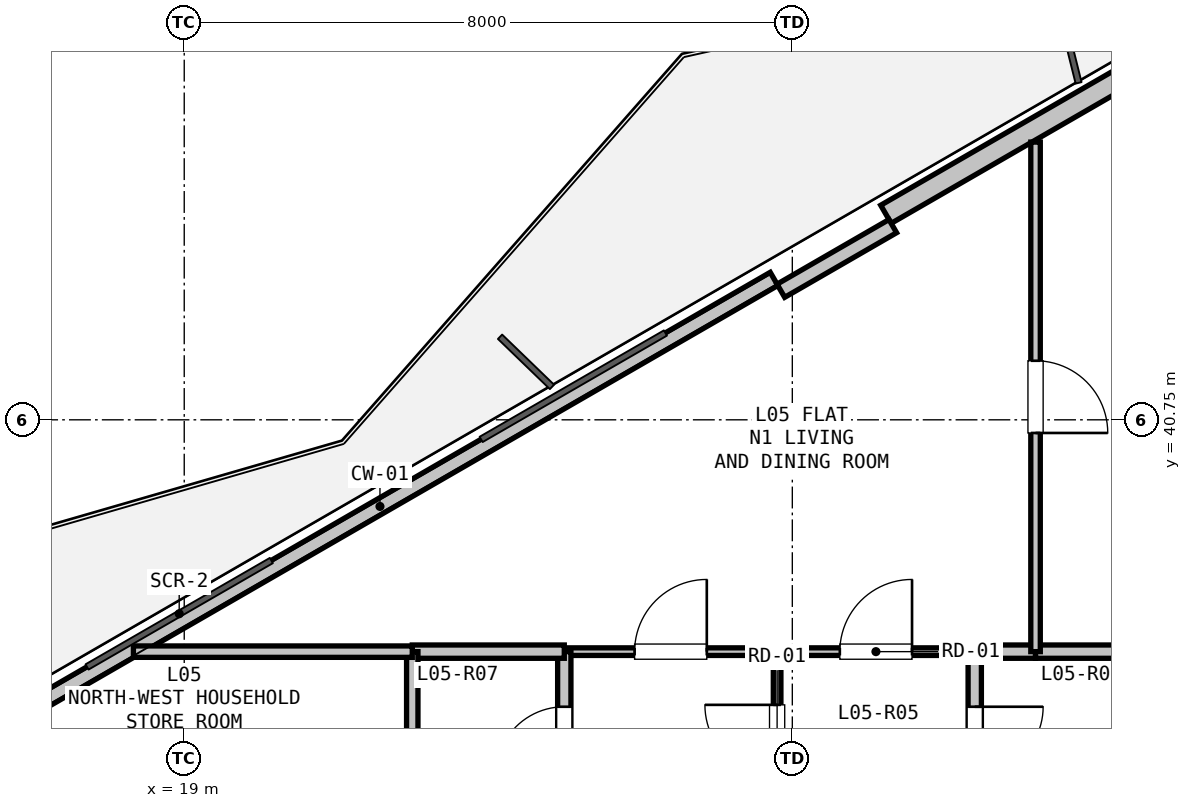
"""IFC4 building model, lengths in metres.
Left out: names, types, materials, properties, quantities, classifications, styles, units other than length and angle.
Written with IfcOpenShell. Run it as: python <this file> out.ifc"""

import sys

from ifc_helpers import new_model, si_unit, direction, frame, frame_2d, origin, place, context, subcontext, project, spatial, rectangle, extrude, element, fill, save


model = new_model("IFC4")
c1 = context("Model", 3, precision=1e-05, world=origin(), true_north=direction((0.0, 1.0)))
c2 = subcontext(c1, "Body", "Model", "MODEL_VIEW")
j1 = project(units=[si_unit("LENGTHUNIT", "METRE"), si_unit("PLANEANGLEUNIT", "RADIAN")], contexts=[c1])
p1 = place(None, origin())
s1 = spatial("IfcSite", under=j1, at=p1, CompositionType="ELEMENT")
p2 = place(p1, origin())
s2 = spatial("IfcBuilding", under=s1, at=p2, CompositionType="ELEMENT")
p3 = place(p2, frame((0.0, 0.0, 22.5)))
s3 = spatial("IfcBuildingStorey", under=s2, at=p3, CompositionType="ELEMENT", Elevation=22.5)
p4 = place(p3, frame((16.39, 36.617, 0.0), z_axis=(0.0, 0.0, 1.0), x_axis=(0.866027351828, 0.499996625875, 0.0)))
e1 = element("IfcWall", 1, at=p4, inside=s3, PredefinedType="PARAPET", context=c2, shape_type="SweptSolid", body=[
    extrude(rectangle(XDim=11.973, YDim=0.2, at=frame_2d((5.987, 0.0))), origin(), (0.0, 0.0, 1.0), 0.2),
])
p5 = place(p3, frame((28.232, 43.454, 0.0), z_axis=(0.0, 0.0, 1.0), x_axis=(0.86603192154, 0.499988710747, 0.0)))
e2 = element("IfcWall", 2, at=p5, inside=s3, PredefinedType="SOLIDWALL", context=c2, shape_type="SweptSolid", body=[
    extrude(rectangle(XDim=12.673, YDim=0.275, at=frame_2d((6.336, 0.0))), origin(), (0.0, 0.0, 1.0), 2.66),
])
p6 = place(p5, frame((4.68, 0.0, 0.9)))
e3 = element("IfcOpeningElement", 3, at=p6, cuts=e2, PredefinedType="OPENING", context=c2, shape_type="SweptSolid", body=[
    extrude(rectangle(XDim=1.2, YDim=1.4, at=frame_2d((0.6, 0.7))), frame((0.0, 0.147, 0.0), z_axis=(0.0, -1.0, 0.0), x_axis=(1.0, 0.0, 0.0)), (0.0, 0.0, 1.0), 0.295),
])
p7 = place(p3, frame((26.85, 42.448, 0.0), z_axis=(0.0, 0.0, 1.0), x_axis=(0.86605165483, 0.499954529098, 0.0)))
e4 = element("IfcWall", 4, at=p7, inside=s3, PredefinedType="PARAPET", context=c2, shape_type="SweptSolid", body=[
    extrude(rectangle(XDim=1.7, YDim=0.2, at=frame_2d((0.85, 0.0))), origin(), (0.0, 0.0, 1.0), 2.66),
])
p8 = place(p3, frame((26.8, 37.7, 0.0), z_axis=(0.0, 0.0, 1.0), x_axis=(1.0, 0.0, 0.0)))
e5 = element("IfcWall", 5, at=p8, inside=s3, PredefinedType="PARTITIONING", context=c2, shape_type="SweptSolid", body=[
    extrude(rectangle(XDim=2.6, YDim=0.1, at=frame_2d((1.3, 0.0))), origin(), (0.0, 0.0, 1.0), 3.04),
])
p9 = place(p8, frame((0.825, 0.0, 0.0)))
e6 = element("IfcOpeningElement", 6, at=p9, cuts=e5, PredefinedType="OPENING", context=c2, shape_type="SweptSolid", body=[
    extrude(rectangle(XDim=0.95, YDim=2.1, at=frame_2d((0.475, 1.05))), frame((0.0, 0.06, 0.0), z_axis=(0.0, -1.0, 0.0), x_axis=(1.0, 0.0, 0.0)), (0.0, 0.0, 1.0), 0.12),
])
p10 = place(p3, frame((29.4, 37.7, 0.0), z_axis=(0.0, 0.0, 1.0), x_axis=(0.0, -1.0, 0.0)))
e7 = element("IfcWall", 7, at=p10, inside=s3, PredefinedType="PLUMBINGWALL", context=c2, shape_type="SweptSolid", body=[
    extrude(rectangle(XDim=2.35, YDim=0.175, at=frame_2d((1.175, 0.0))), origin(), (0.0, 0.0, 1.0), 3.04),
])
p11 = place(p10, frame((0.725, 0.0, 0.0)))
e8 = element("IfcOpeningElement", 8, at=p11, cuts=e7, PredefinedType="OPENING", context=c2, shape_type="SweptSolid", body=[
    extrude(rectangle(XDim=0.9, YDim=2.1, at=frame_2d((0.45, 1.05))), frame((0.0, 0.097, 0.0), z_axis=(0.0, -1.0, 0.0), x_axis=(1.0, 0.0, 0.0)), (0.0, 0.0, 1.0), 0.195),
])
p12 = place(p3, frame((26.8, 35.35, 0.0), z_axis=(0.0, 0.0, 1.0), x_axis=(0.0, 1.0, 0.0)))
e9 = element("IfcWall", 9, at=p12, inside=s3, PredefinedType="PARTITIONING", context=c2, shape_type="SweptSolid", body=[
    extrude(rectangle(XDim=2.35, YDim=0.1, at=frame_2d((1.175, 0.0))), origin(), (0.0, 0.0, 1.0), 3.04),
])
p13 = place(p12, frame((0.7, 0.0, 0.0)))
e10 = element("IfcOpeningElement", 10, at=p13, cuts=e9, PredefinedType="OPENING", context=c2, shape_type="SweptSolid", body=[
    extrude(rectangle(XDim=0.95, YDim=2.1, at=frame_2d((0.475, 1.05))), frame((0.0, 0.06, 0.0), z_axis=(0.0, -1.0, 0.0), x_axis=(1.0, 0.0, 0.0)), (0.0, 0.0, 1.0), 0.12),
])
p14 = place(p3, frame((24.0, 37.7, 0.0), z_axis=(0.0, 0.0, 1.0), x_axis=(1.0, 0.0, 0.0)))
e11 = element("IfcWall", 11, at=p14, inside=s3, PredefinedType="PARTITIONING", context=c2, shape_type="SweptSolid", body=[
    extrude(rectangle(XDim=2.8, YDim=0.1, at=frame_2d((1.4, 0.0))), origin(), (0.0, 0.0, 1.0), 3.04),
])
p15 = place(p14, frame((0.925, 0.0, 0.0)))
e12 = element("IfcOpeningElement", 12, at=p15, cuts=e11, PredefinedType="OPENING", context=c2, shape_type="SweptSolid", body=[
    extrude(rectangle(XDim=0.95, YDim=2.1, at=frame_2d((0.475, 1.05))), frame((0.0, 0.06, 0.0), z_axis=(0.0, -1.0, 0.0), x_axis=(1.0, 0.0, 0.0)), (0.0, 0.0, 1.0), 0.12),
])
p16 = place(p3, frame((24.0, 35.35, 0.0), z_axis=(0.0, 0.0, 1.0), x_axis=(0.0, 1.0, 0.0)))
e13 = element("IfcWall", 13, at=p16, inside=s3, PredefinedType="PLUMBINGWALL", context=c2, shape_type="SweptSolid", body=[
    extrude(rectangle(XDim=2.35, YDim=0.175, at=frame_2d((1.175, 0.0))), origin(), (0.0, 0.0, 1.0), 3.04),
])
p17 = place(p16, frame((0.725, 0.0, 0.0)))
e14 = element("IfcOpeningElement", 14, at=p17, cuts=e13, PredefinedType="OPENING", context=c2, shape_type="SweptSolid", body=[
    extrude(rectangle(XDim=0.9, YDim=2.1, at=frame_2d((0.45, 1.05))), frame((0.0, 0.097, 0.0), z_axis=(0.0, -1.0, 0.0), x_axis=(1.0, 0.0, 0.0)), (0.0, 0.0, 1.0), 0.195),
])
p18 = place(p3, frame((22.0, 37.7, 0.0), z_axis=(0.0, 0.0, 1.0), x_axis=(1.0, 0.0, 0.0)))
e15 = element("IfcWall", 15, at=p18, inside=s3, PredefinedType="PLUMBINGWALL", context=c2, shape_type="SweptSolid", body=[
    extrude(rectangle(XDim=2.0, YDim=0.175, at=frame_2d((1.0, 0.0))), origin(), (0.0, 0.0, 1.0), 3.04),
])
p19 = place(p3, frame((22.0, 35.35, 0.0), z_axis=(0.0, 0.0, 1.0), x_axis=(0.0, 1.0, 0.0)))
e16 = element("IfcWall", 16, at=p19, inside=s3, PredefinedType="PARTITIONING", context=c2, shape_type="SweptSolid", body=[
    extrude(rectangle(XDim=2.35, YDim=0.15, at=frame_2d((1.175, 0.0))), origin(), (0.0, 0.0, 1.0), 3.04),
])
p20 = place(p3, frame((29.4, 37.7, 0.0), z_axis=(0.0, 0.0, 1.0), x_axis=(1.0, 0.0, 0.0)))
e17 = element("IfcWall", 17, at=p20, inside=s3, PredefinedType="PLUMBINGWALL", context=c2, shape_type="SweptSolid", body=[
    extrude(rectangle(XDim=0.8, YDim=0.175, at=frame_2d((0.4, 0.0))), origin(), (0.0, 0.0, 1.0), 3.04),
])
p21 = place(p3, frame((30.2, 37.7, 0.0), z_axis=(0.0, 0.0, 1.0), x_axis=(1.0, 0.0, 0.0)))
e18 = element("IfcWall", 18, at=p21, inside=s3, PredefinedType="PLUMBINGWALL", context=c2, shape_type="SweptSolid", body=[
    extrude(rectangle(XDim=1.2, YDim=0.175, at=frame_2d((0.6, 0.0))), origin(), (0.0, 0.0, 1.0), 3.04),
])
p22 = place(p3, frame((18.331, 37.7, 0.0), z_axis=(0.0, 0.0, 1.0), x_axis=(1.0, 0.0, 0.0)))
e19 = element("IfcWall", 19, at=p22, inside=s3, PredefinedType="PARTITIONING", context=c2, shape_type="SweptSolid", body=[
    extrude(rectangle(XDim=3.669, YDim=0.15, at=frame_2d((1.834, 0.0))), origin(), (0.0, 0.0, 1.0), 2.365),
])
p23 = place(p3, frame((30.2, 44.404, 0.0), z_axis=(0.0, 0.0, 1.0), x_axis=(0.0, -1.0, 0.0)))
e20 = element("IfcWall", 20, at=p23, inside=s3, PredefinedType="PARTITIONING", context=c2, shape_type="SweptSolid", body=[
    extrude(rectangle(XDim=6.704, YDim=0.125, at=frame_2d((3.352, 0.0))), origin(), (0.0, 0.0, 1.0), 2.365),
])
p24 = place(p23, frame((2.877, 0.0, 0.0)))
e21 = element("IfcOpeningElement", 21, at=p24, cuts=e20, PredefinedType="OPENING", context=c2, shape_type="SweptSolid", body=[
    extrude(rectangle(XDim=0.95, YDim=2.1, at=frame_2d((0.475, 1.05))), frame((0.0, 0.073, 0.0), z_axis=(0.0, -1.0, 0.0), x_axis=(1.0, 0.0, 0.0)), (0.0, 0.0, 1.0), 0.145),
])
p25 = place(p13, origin())
e22 = element("IfcDoor", 22, at=p25, inside=s3, OperationType="SINGLE_SWING_RIGHT", PredefinedType="DOOR", context=c2, shape_type="SweptSolid", body=[
    extrude(rectangle(XDim=0.95, YDim=2.1, at=frame_2d((0.475, 1.05))), frame((0.0, 0.025, 0.0), z_axis=(0.0, -1.0, 0.0), x_axis=(1.0, 0.0, 0.0)), (0.0, 0.0, 1.0), 0.05),
])
fill(e10, e22)
p26 = place(p11, origin())
e23 = element("IfcDoor", 23, at=p26, inside=s3, OperationType="SINGLE_SWING_LEFT", PredefinedType="DOOR", context=c2, shape_type="SweptSolid", body=[
    extrude(rectangle(XDim=0.9, YDim=2.1, at=frame_2d((0.45, 1.05))), frame((0.0, 0.025, 0.0), z_axis=(0.0, -1.0, 0.0), x_axis=(1.0, 0.0, 0.0)), (0.0, 0.0, 1.0), 0.05),
])
fill(e8, e23)
p27 = place(p9, origin())
e24 = element("IfcDoor", 24, at=p27, inside=s3, OperationType="SINGLE_SWING_RIGHT", PredefinedType="DOOR", context=c2, shape_type="SweptSolid", body=[
    extrude(rectangle(XDim=0.95, YDim=2.1, at=frame_2d((0.475, 1.05))), frame((0.0, 0.025, 0.0), z_axis=(0.0, -1.0, 0.0), x_axis=(1.0, 0.0, 0.0)), (0.0, 0.0, 1.0), 0.05),
])
fill(e6, e24)
p28 = place(p15, origin())
e25 = element("IfcDoor", 25, at=p28, inside=s3, OperationType="SINGLE_SWING_RIGHT", PredefinedType="DOOR", context=c2, shape_type="SweptSolid", body=[
    extrude(rectangle(XDim=0.95, YDim=2.1, at=frame_2d((0.475, 1.05))), frame((0.0, 0.025, 0.0), z_axis=(0.0, -1.0, 0.0), x_axis=(1.0, 0.0, 0.0)), (0.0, 0.0, 1.0), 0.05),
])
fill(e12, e25)
p29 = place(p24, origin())
e26 = element("IfcDoor", 26, at=p29, inside=s3, OperationType="SINGLE_SWING_RIGHT", PredefinedType="DOOR", context=c2, shape_type="SweptSolid", body=[
    extrude(rectangle(XDim=0.95, YDim=2.1, at=frame_2d((0.475, 1.05))), frame((0.0, 0.025, 0.0), z_axis=(0.0, -1.0, 0.0), x_axis=(1.0, 0.0, 0.0)), (0.0, 0.0, 1.0), 0.05),
])
fill(e21, e26)
p30 = place(p17, origin())
e27 = element("IfcDoor", 27, at=p30, inside=s3, OperationType="SINGLE_SWING_LEFT", PredefinedType="DOOR", context=c2, shape_type="SweptSolid", body=[
    extrude(rectangle(XDim=0.9, YDim=2.1, at=frame_2d((0.45, 1.05))), frame((0.0, 0.025, 0.0), z_axis=(0.0, -1.0, 0.0), x_axis=(1.0, 0.0, 0.0)), (0.0, 0.0, 1.0), 0.05),
])
fill(e14, e27)
save(model, sys.argv[1])
